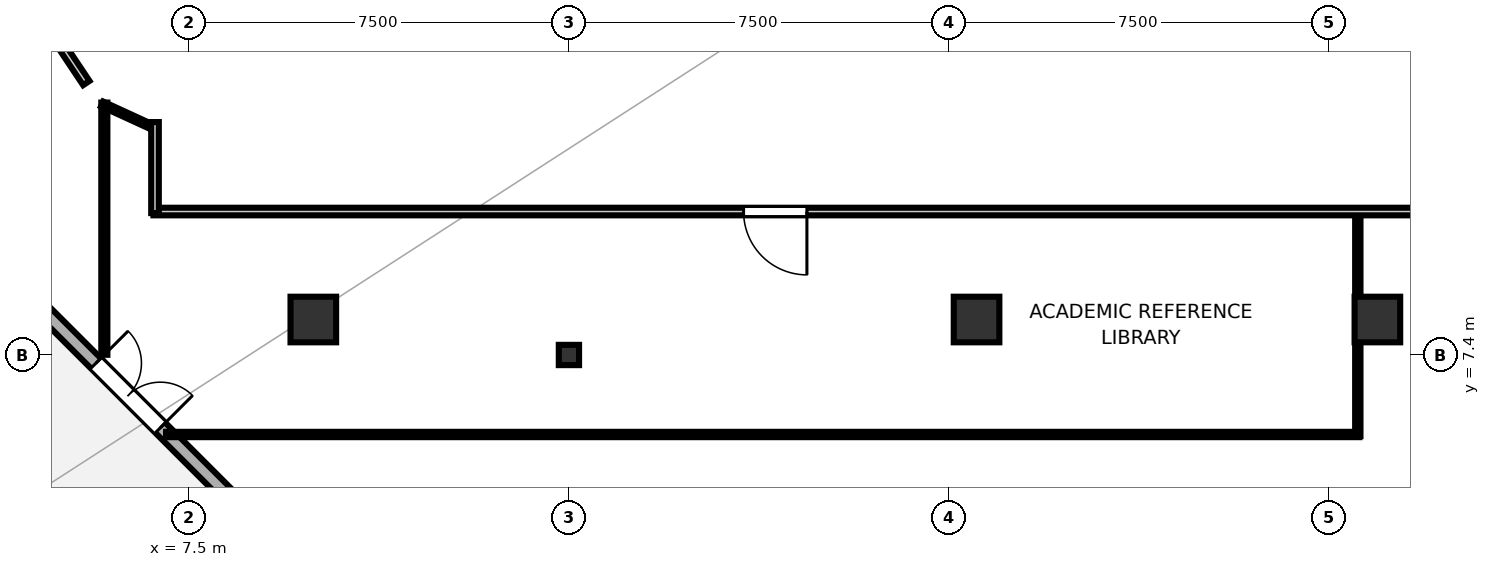
"""IFC4 building model, lengths in metres.
Left out: names, types, materials, properties, quantities, classifications, styles, units other than length and angle.
Written with IfcOpenShell. Run it as: python <this file> out.ifc"""

import sys

from ifc_helpers import new_model, si_unit, direction, frame, frame_2d, origin, origin_2d, place, context, subcontext, project, spatial, rectangle, i_section, extrude, element, fill, save


model = new_model("IFC4")
c1 = context("Model", 3, precision=1e-05, world=origin(), true_north=direction((0.0, 1.0)))
c2 = subcontext(c1, "Body", "Model", "MODEL_VIEW")
j1 = project(units=[si_unit("LENGTHUNIT", "METRE"), si_unit("PLANEANGLEUNIT", "RADIAN")], contexts=[c1])
p1 = place(None, origin())
s1 = spatial("IfcSite", under=j1, at=p1, CompositionType="ELEMENT")
p2 = place(p1, origin())
s2 = spatial("IfcBuilding", under=s1, at=p2, CompositionType="ELEMENT")
p3 = place(p2, frame((0.0, 0.0, 15.8)))
s3 = spatial("IfcBuildingStorey", under=s2, at=p3, CompositionType="ELEMENT", Elevation=15.8)
for number, where, z_axis, x_axis in (
    (1, (9.955, 8.1, 0.0), (0.0, 0.0, 1.0), (1.0, 0.0, 0.0)),
    (2, (23.045, 8.1, 0.0), (0.0, 0.0, 1.0), (1.0, 0.0, 0.0)),
    (3, (30.955, 8.1, 0.0), (0.0, 0.0, 1.0), (1.0, 0.0, 0.0)),
):
    element("IfcColumn", number, at=place(p3, frame(where, z_axis=z_axis, x_axis=x_axis)), inside=s3, PredefinedType="COLUMN", context=c2, shape_type="SweptSolid", body=[
        extrude(rectangle(XDim=0.9, YDim=0.9, at=origin_2d()), origin(), (0.0, 0.0, 1.0), 4.8),
    ])
p4 = place(p3, frame((15.0, 7.4, 0.0), z_axis=(0.0, 0.0, 1.0), x_axis=(1.0, 0.0, 0.0)))
e4 = element("IfcColumn", 4, at=p4, inside=s3, PredefinedType="COLUMN", context=c2, shape_type="SweptSolid", body=[
    extrude(i_section(OverallWidth=0.4, OverallDepth=0.4, WebThickness=0.013, FlangeThickness=0.021, at=origin_2d()), origin(), (0.0, 0.0, 1.0), 4.8),
])
p5 = place(p3, frame((4.2, 8.7, 0.0), z_axis=(0.0, 0.0, 1.0), x_axis=(0.707106781187, -0.707106781187, 0.0)))
e5 = element("IfcWall", 5, at=p5, inside=s3, PredefinedType="SOLIDWALL", context=c2, shape_type="SweptSolid", body=[
    extrude(rectangle(XDim=5.94, YDim=0.28, at=frame_2d((2.97, 0.0))), origin(), (0.0, 0.0, 1.0), 4.5),
])
p6 = place(p5, frame((2.07, 0.0, 0.0)))
e6 = element("IfcOpeningElement", 6, at=p6, cuts=e5, PredefinedType="OPENING", context=c2, shape_type="SweptSolid", body=[
    extrude(rectangle(XDim=1.8, YDim=2.2, at=frame_2d((0.9, 1.1))), frame((0.0, 0.15, 0.0), z_axis=(0.0, -1.0, 0.0), x_axis=(1.0, 0.0, 0.0)), (0.0, 0.0, 1.0), 0.3),
])
p7 = place(p3, frame((67.2, 10.231, 0.0), z_axis=(0.0, 0.0, 1.0), x_axis=(-1.0, 0.0, 0.0)))
e7 = element("IfcWall", 7, at=p7, inside=s3, PredefinedType="PARTITIONING", context=c2, shape_type="SweptSolid", body=[
    extrude(rectangle(XDim=60.4, YDim=0.15, at=frame_2d((30.2, 0.0))), origin(), (0.0, 0.0, 1.0), 3.02),
])
p8 = place(p7, frame((47.503, 0.0, 0.0)))
e8 = element("IfcOpeningElement", 8, at=p8, cuts=e7, PredefinedType="OPENING", context=c2, shape_type="SweptSolid", body=[
    extrude(rectangle(XDim=1.25, YDim=2.2, at=frame_2d((0.625, 1.1))), frame((0.0, 0.085, 0.0), z_axis=(0.0, -1.0, 0.0), x_axis=(1.0, 0.0, 0.0)), (0.0, 0.0, 1.0), 0.17),
])
p9 = place(p7, frame((12.197, 0.0, 0.0)))
e9 = element("IfcOpeningElement", 9, at=p9, cuts=e7, PredefinedType="OPENING", context=c2, shape_type="SweptSolid", body=[
    extrude(rectangle(XDim=1.25, YDim=2.2, at=frame_2d((0.625, 1.1))), frame((0.0, 0.085, 0.0), z_axis=(0.0, -1.0, 0.0), x_axis=(1.0, 0.0, 0.0)), (0.0, 0.0, 1.0), 0.17),
])
p10 = place(p3, frame((6.831, 10.2, 0.0), z_axis=(0.0, 0.0, 1.0), x_axis=(0.0, 1.0, 0.0)))
e10 = element("IfcWall", 10, at=p10, inside=s3, PredefinedType="PARTITIONING", context=c2, shape_type="SweptSolid", body=[
    extrude(rectangle(XDim=1.796, YDim=0.15, at=frame_2d((0.898, 0.0))), origin(), (0.0, 0.0, 1.0), 3.02),
])
p11 = place(p3, frame((5.475, 12.767, 0.0), z_axis=(0.0, 0.0, 1.0), x_axis=(-0.555576038047, 0.831465733478, 0.0)))
e11 = element("IfcWall", 11, at=p11, inside=s3, PredefinedType="PARTITIONING", context=c2, shape_type="SweptSolid", body=[
    extrude(rectangle(XDim=2.315, YDim=0.15, at=frame_2d((1.157, 0.0))), origin(), (0.0, 0.0, 1.0), 3.02),
])
p12 = place(p3, frame((30.6, 5.831, 0.0), z_axis=(0.0, 0.0, 1.0), x_axis=(-1.0, 0.0, 0.0)))
e12 = element("IfcWall", 12, at=p12, inside=s3, PredefinedType="PARTITIONING", context=c2, shape_type="SweptSolid", body=[
    extrude(rectangle(XDim=23.551, YDim=0.105, at=frame_2d((11.775, 0.0))), origin(), (0.0, 0.0, 1.0), 3.02),
])
p13 = place(p3, frame((5.831, 7.404, 0.0), z_axis=(0.0, 0.0, 1.0), x_axis=(0.0, 1.0, 0.0)))
e13 = element("IfcWall", 13, at=p13, inside=s3, PredefinedType="PARTITIONING", context=c2, shape_type="SweptSolid", body=[
    extrude(rectangle(XDim=4.978, YDim=0.12, at=frame_2d((2.489, 0.0))), origin(), (0.0, 0.0, 1.0), 3.02),
])
p14 = place(p3, frame((5.787, 12.353, 0.0), z_axis=(0.0, 0.0, 1.0), x_axis=(0.908698668485, -0.417452667849, 0.0)))
e14 = element("IfcWall", 14, at=p14, inside=s3, PredefinedType="PARTITIONING", context=c2, shape_type="SweptSolid", body=[
    extrude(rectangle(XDim=1.032, YDim=0.105, at=frame_2d((0.516, 0.0))), origin(), (0.0, 0.0, 1.0), 3.02),
])
p15 = place(p3, frame((30.569, 10.138, 0.0), z_axis=(0.0, 0.0, 1.0), x_axis=(0.0, -1.0, 0.0)))
e15 = element("IfcWall", 15, at=p15, inside=s3, PredefinedType="PARTITIONING", context=c2, shape_type="SweptSolid", body=[
    extrude(rectangle(XDim=4.338, YDim=0.105, at=frame_2d((2.169, 0.0))), origin(), (0.0, 0.0, 1.0), 3.02),
])
p16 = place(p6, origin())
e16 = element("IfcDoor", 16, at=p16, inside=s3, OperationType="DOUBLE_DOOR_SINGLE_SWING", PredefinedType="DOOR", context=c2, shape_type="SweptSolid", body=[
    extrude(rectangle(XDim=1.8, YDim=2.2, at=frame_2d((0.9, 1.1))), frame((0.0, 0.025, 0.0), z_axis=(0.0, -1.0, 0.0), x_axis=(1.0, 0.0, 0.0)), (0.0, 0.0, 1.0), 0.05),
])
fill(e6, e16)
p17 = place(p8, origin())
e17 = element("IfcDoor", 17, at=p17, inside=s3, OperationType="SINGLE_SWING_LEFT", PredefinedType="DOOR", context=c2, shape_type="SweptSolid", body=[
    extrude(rectangle(XDim=1.25, YDim=2.2, at=frame_2d((0.625, 1.1))), frame((0.0, 0.025, 0.0), z_axis=(0.0, -1.0, 0.0), x_axis=(1.0, 0.0, 0.0)), (0.0, 0.0, 1.0), 0.05),
])
fill(e8, e17)
save(model, sys.argv[1])
